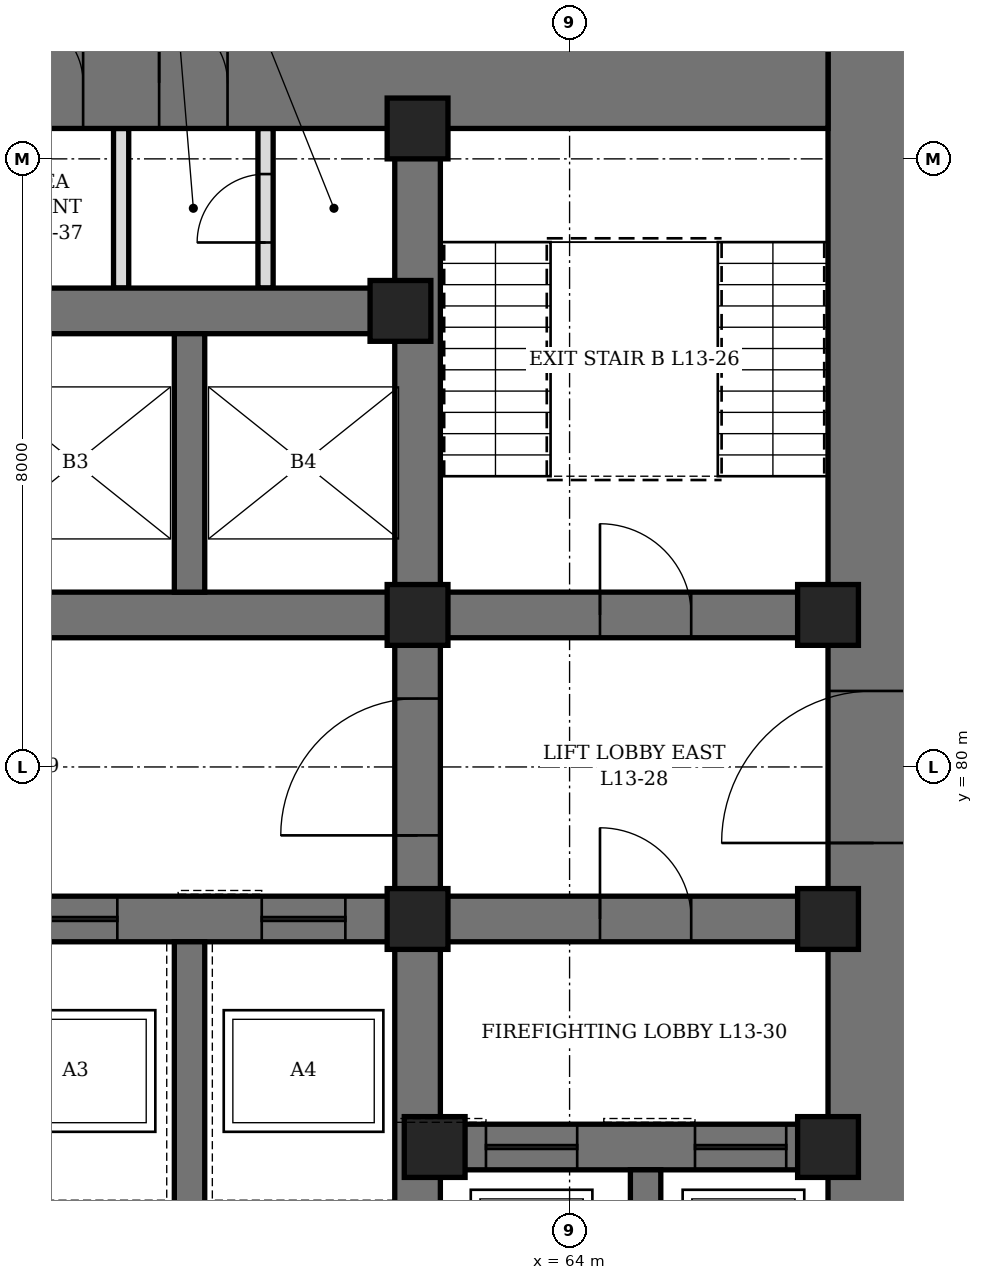
"""IFC4 building model, lengths in metres.
Left out: names, types, materials, properties, quantities, classifications, styles, units other than length and angle.
Written with IfcOpenShell. Run it as: python <this file> out.ifc"""

import sys

from ifc_helpers import new_model, si_unit, direction, frame, frame_2d, origin, origin_2d, place, context, subcontext, project, spatial, rectangle, hollow_rectangle, extrude, element, fill, save


model = new_model("IFC4")
c1 = context("Model", 3, precision=1e-05, world=origin(), true_north=direction((0.0, 1.0)))
c2 = subcontext(c1, "Body", "Model", "MODEL_VIEW")
j1 = project(units=[si_unit("LENGTHUNIT", "METRE"), si_unit("PLANEANGLEUNIT", "RADIAN")], contexts=[c1])
p1 = place(None, origin())
s1 = spatial("IfcSite", under=j1, at=p1, CompositionType="ELEMENT")
p2 = place(p1, origin())
s2 = spatial("IfcBuilding", under=s1, at=p2, CompositionType="ELEMENT")
p3 = place(p2, frame((0.0, 0.0, 64.3)))
s3 = spatial("IfcBuildingStorey", under=s2, at=p3, CompositionType="ELEMENT", Elevation=64.3)
p4 = place(p3, frame((68.0, 70.4, 0.0), z_axis=(0.0, 0.0, 1.0), x_axis=(0.0, 1.0, 0.0)))
e1 = element("IfcWall", 1, at=p4, inside=s3, PredefinedType="SHEAR", context=c2, shape_type="SweptSolid", body=[
    extrude(rectangle(XDim=19.2, YDim=1.2, at=frame_2d((9.6, 0.0))), origin(), (0.0, 0.0, 1.0), 4.2),
])
p5 = place(p4, frame((8.6, 0.0, 0.0)))
e2 = element("IfcOpeningElement", 2, at=p5, cuts=e1, PredefinedType="OPENING", context=c2, shape_type="SweptSolid", body=[
    extrude(rectangle(XDim=2.0, YDim=2.4, at=frame_2d((1.0, 1.2))), frame((0.0, 0.61, 0.0), z_axis=(0.0, -1.0, 0.0), x_axis=(1.0, 0.0, 0.0)), (0.0, 0.0, 1.0), 1.22),
])
p6 = place(p3, frame((44.6, 89.0, 0.0), z_axis=(0.0, 0.0, 1.0), x_axis=(1.0, 0.0, 0.0)))
e3 = element("IfcWall", 3, at=p6, inside=s3, PredefinedType="SHEAR", context=c2, shape_type="SweptSolid", body=[
    extrude(rectangle(XDim=22.8, YDim=1.2, at=frame_2d((11.4, 0.0))), origin(), (0.0, 0.0, 1.0), 4.2),
])
p7 = place(p6, frame((9.2, 0.0, 0.0)))
e4 = element("IfcOpeningElement", 4, at=p7, cuts=e3, PredefinedType="OPENING", context=c2, shape_type="SweptSolid", body=[
    extrude(rectangle(XDim=1.0, YDim=2.1, at=frame_2d((0.5, 1.05))), frame((0.0, 0.61, 0.0), z_axis=(0.0, -1.0, 0.0), x_axis=(1.0, 0.0, 0.0)), (0.0, 0.0, 1.0), 1.22),
])
p8 = place(p6, frame((6.45, 0.0, 0.0)))
e5 = element("IfcOpeningElement", 5, at=p8, cuts=e3, PredefinedType="OPENING", context=c2, shape_type="SweptSolid", body=[
    extrude(rectangle(XDim=0.9, YDim=2.1, at=frame_2d((0.45, 1.05))), frame((0.0, 0.61, 0.0), z_axis=(0.0, -1.0, 0.0), x_axis=(1.0, 0.0, 0.0)), (0.0, 0.0, 1.0), 1.22),
])
p9 = place(p6, frame((12.1, 0.0, 0.0)))
e6 = element("IfcOpeningElement", 6, at=p9, cuts=e3, PredefinedType="OPENING", context=c2, shape_type="SweptSolid", body=[
    extrude(rectangle(XDim=0.9, YDim=2.1, at=frame_2d((0.45, 1.05))), frame((0.0, 0.61, 0.0), z_axis=(0.0, -1.0, 0.0), x_axis=(1.0, 0.0, 0.0)), (0.0, 0.0, 1.0), 1.22),
])
p10 = place(p6, frame((14.0, 0.0, 0.0)))
e7 = element("IfcOpeningElement", 7, at=p10, cuts=e3, PredefinedType="OPENING", context=c2, shape_type="SweptSolid", body=[
    extrude(rectangle(XDim=0.9, YDim=2.1, at=frame_2d((0.45, 1.05))), frame((0.0, 0.61, 0.0), z_axis=(0.0, -1.0, 0.0), x_axis=(1.0, 0.0, 0.0)), (0.0, 0.0, 1.0), 1.22),
])
p11 = place(p3, frame((62.0, 71.6, 0.0), z_axis=(0.0, 0.0, 1.0), x_axis=(0.0, 1.0, 0.0)))
e8 = element("IfcWall", 8, at=p11, inside=s3, PredefinedType="SHEAR", context=c2, shape_type="SweptSolid", body=[
    extrude(rectangle(XDim=16.8, YDim=0.6, at=frame_2d((8.4, 0.0))), origin(), (0.0, 0.0, 1.0), 4.2),
])
p12 = place(p11, frame((7.5, 0.0, 0.0)))
e9 = element("IfcOpeningElement", 9, at=p12, cuts=e8, PredefinedType="OPENING", context=c2, shape_type="SweptSolid", body=[
    extrude(rectangle(XDim=1.8, YDim=2.4, at=frame_2d((0.9, 1.2))), frame((0.0, 0.31, 0.0), z_axis=(0.0, -1.0, 0.0), x_axis=(1.0, 0.0, 0.0)), (0.0, 0.0, 1.0), 0.62),
])
p13 = place(p3, frame((62.3, 75.0, 0.0), z_axis=(0.0, 0.0, 1.0), x_axis=(1.0, 0.0, 0.0)))
e10 = element("IfcWall", 10, at=p13, inside=s3, PredefinedType="SHEAR", context=c2, shape_type="SweptSolid", body=[
    extrude(rectangle(XDim=5.1, YDim=0.6, at=frame_2d((2.55, 0.0))), origin(), (0.0, 0.0, 1.0), 4.2),
])
p14 = place(p13, frame((0.6, 0.0, 0.0)))
e11 = element("IfcOpeningElement", 11, at=p14, cuts=e10, PredefinedType="OPENING", context=c2, shape_type="SweptSolid", body=[
    extrude(rectangle(XDim=1.2, YDim=2.2, at=frame_2d((0.6, 1.1))), frame((0.0, 0.31, 0.0), z_axis=(0.0, -1.0, 0.0), x_axis=(1.0, 0.0, 0.0)), (0.0, 0.0, 1.0), 0.62),
])
p15 = place(p13, frame((3.35, 0.0, 0.0)))
e12 = element("IfcOpeningElement", 12, at=p15, cuts=e10, PredefinedType="OPENING", context=c2, shape_type="SweptSolid", body=[
    extrude(rectangle(XDim=1.2, YDim=2.2, at=frame_2d((0.6, 1.1))), frame((0.0, 0.31, 0.0), z_axis=(0.0, -1.0, 0.0), x_axis=(1.0, 0.0, 0.0)), (0.0, 0.0, 1.0), 0.62),
])
p16 = place(p3, frame((62.3, 78.0, 0.0), z_axis=(0.0, 0.0, 1.0), x_axis=(1.0, 0.0, 0.0)))
e13 = element("IfcWall", 13, at=p16, inside=s3, PredefinedType="SHEAR", context=c2, shape_type="SweptSolid", body=[
    extrude(rectangle(XDim=5.1, YDim=0.6, at=frame_2d((2.55, 0.0))), origin(), (0.0, 0.0, 1.0), 4.2),
])
p17 = place(p16, frame((2.1, 0.0, 0.0)))
e14 = element("IfcOpeningElement", 14, at=p17, cuts=e13, PredefinedType="OPENING", context=c2, shape_type="SweptSolid", body=[
    extrude(rectangle(XDim=1.2, YDim=2.1, at=frame_2d((0.6, 1.05))), frame((0.0, 0.31, 0.0), z_axis=(0.0, -1.0, 0.0), x_axis=(1.0, 0.0, 0.0)), (0.0, 0.0, 1.0), 0.62),
])
p18 = place(p3, frame((62.3, 82.0, 0.0), z_axis=(0.0, 0.0, 1.0), x_axis=(1.0, 0.0, 0.0)))
e15 = element("IfcWall", 15, at=p18, inside=s3, PredefinedType="SHEAR", context=c2, shape_type="SweptSolid", body=[
    extrude(rectangle(XDim=5.1, YDim=0.6, at=frame_2d((2.55, 0.0))), origin(), (0.0, 0.0, 1.0), 4.2),
])
p19 = place(p18, frame((2.1, 0.0, 0.0)))
e16 = element("IfcOpeningElement", 16, at=p19, cuts=e15, PredefinedType="OPENING", context=c2, shape_type="SweptSolid", body=[
    extrude(rectangle(XDim=1.2, YDim=2.1, at=frame_2d((0.6, 1.05))), frame((0.0, 0.31, 0.0), z_axis=(0.0, -1.0, 0.0), x_axis=(1.0, 0.0, 0.0)), (0.0, 0.0, 1.0), 0.62),
])
p20 = place(p3, frame((50.3, 78.0, 0.0), z_axis=(0.0, 0.0, 1.0), x_axis=(1.0, 0.0, 0.0)))
e17 = element("IfcWall", 17, at=p20, inside=s3, PredefinedType="SHEAR", context=c2, shape_type="SweptSolid", body=[
    extrude(rectangle(XDim=11.4, YDim=0.6, at=frame_2d((5.7, 0.0))), origin(), (0.0, 0.0, 1.0), 4.2),
])
p21 = place(p20, frame((0.65, 0.0, 0.0)))
e18 = element("IfcOpeningElement", 18, at=p21, cuts=e17, PredefinedType="OPENING", context=c2, shape_type="SweptSolid", body=[
    extrude(rectangle(XDim=1.1, YDim=2.2, at=frame_2d((0.55, 1.1))), frame((0.0, 0.31, 0.0), z_axis=(0.0, -1.0, 0.0), x_axis=(1.0, 0.0, 0.0)), (0.0, 0.0, 1.0), 0.62),
])
p22 = place(p20, frame((3.65, 0.0, 0.0)))
e19 = element("IfcOpeningElement", 19, at=p22, cuts=e17, PredefinedType="OPENING", context=c2, shape_type="SweptSolid", body=[
    extrude(rectangle(XDim=1.1, YDim=2.2, at=frame_2d((0.55, 1.1))), frame((0.0, 0.31, 0.0), z_axis=(0.0, -1.0, 0.0), x_axis=(1.0, 0.0, 0.0)), (0.0, 0.0, 1.0), 0.62),
])
p23 = place(p20, frame((6.65, 0.0, 0.0)))
e20 = element("IfcOpeningElement", 20, at=p23, cuts=e17, PredefinedType="OPENING", context=c2, shape_type="SweptSolid", body=[
    extrude(rectangle(XDim=1.1, YDim=2.2, at=frame_2d((0.55, 1.1))), frame((0.0, 0.31, 0.0), z_axis=(0.0, -1.0, 0.0), x_axis=(1.0, 0.0, 0.0)), (0.0, 0.0, 1.0), 0.62),
])
p24 = place(p20, frame((9.65, 0.0, 0.0)))
e21 = element("IfcOpeningElement", 21, at=p24, cuts=e17, PredefinedType="OPENING", context=c2, shape_type="SweptSolid", body=[
    extrude(rectangle(XDim=1.1, YDim=2.2, at=frame_2d((0.55, 1.1))), frame((0.0, 0.31, 0.0), z_axis=(0.0, -1.0, 0.0), x_axis=(1.0, 0.0, 0.0)), (0.0, 0.0, 1.0), 0.62),
])
for number, where, z_axis, x_axis in (
    (22, (50.3, 82.0, 0.0), (0.0, 0.0, 1.0), (1.0, 0.0, 0.0)),
    (23, (50.3, 86.0, 0.0), (0.0, 0.0, 1.0), (1.0, 0.0, 0.0)),
):
    element("IfcWall", number, at=place(p3, frame(where, z_axis=z_axis, x_axis=x_axis)), inside=s3, PredefinedType="SHEAR", context=c2, shape_type="SweptSolid", body=[
        extrude(rectangle(XDim=11.4, YDim=0.6, at=frame_2d((5.7, 0.0))), origin(), (0.0, 0.0, 1.0), 4.2),
    ])
p25 = place(p3, frame((59.0, 74.2, 0.0), z_axis=(0.0, 0.0, 1.0), x_axis=(0.0, 1.0, 0.0)))
e24 = element("IfcWall", 24, at=p25, inside=s3, PredefinedType="SHEAR", context=c2, shape_type="SweptSolid", body=[
    extrude(rectangle(XDim=3.5, YDim=0.4, at=frame_2d((1.75, 0.0))), origin(), (0.0, 0.0, 1.0), 4.2),
])
p26 = place(p3, frame((59.0, 82.3, 0.0), z_axis=(0.0, 0.0, 1.0), x_axis=(0.0, 1.0, 0.0)))
e25 = element("IfcWall", 25, at=p26, inside=s3, PredefinedType="SHEAR", context=c2, shape_type="SweptSolid", body=[
    extrude(rectangle(XDim=3.4, YDim=0.4, at=frame_2d((1.7, 0.0))), origin(), (0.0, 0.0, 1.0), 4.2),
])
p27 = place(p3, frame((65.0, 71.6, 0.0), z_axis=(0.0, 0.0, 1.0), x_axis=(0.0, 1.0, 0.0)))
e26 = element("IfcWall", 26, at=p27, inside=s3, PredefinedType="SHEAR", context=c2, shape_type="SweptSolid", body=[
    extrude(rectangle(XDim=3.1, YDim=0.4, at=frame_2d((1.55, 0.0))), origin(), (0.0, 0.0, 1.0), 4.2),
])
for number, where, z_axis, x_axis in (
    (27, (61.775, 86.0, 0.0), (0.0, 0.0, 1.0), (1.0, 0.0, 0.0)),
    (28, (62.0, 78.0, 0.0), (0.0, 0.0, 1.0), (1.0, 0.0, 0.0)),
    (29, (62.0, 82.0, 0.0), (0.0, 0.0, 1.0), (1.0, 0.0, 0.0)),
    (30, (62.0, 88.4, 0.0), (0.0, 0.0, 1.0), (1.0, 0.0, 0.0)),
    (31, (62.225, 75.0, 0.0), (0.0, 0.0, 1.0), (1.0, 0.0, 0.0)),
    (32, (67.4, 75.0, 0.0), (0.0, 0.0, 1.0), (1.0, 0.0, 0.0)),
    (33, (67.4, 78.0, 0.0), (0.0, 0.0, 1.0), (1.0, 0.0, 0.0)),
    (34, (67.4, 82.0, 0.0), (0.0, 0.0, 1.0), (1.0, 0.0, 0.0)),
):
    element("IfcColumn", number, at=place(p3, frame(where, z_axis=z_axis, x_axis=x_axis)), inside=s3, PredefinedType="COLUMN", context=c2, shape_type="SweptSolid", body=[
        extrude(hollow_rectangle(XDim=0.8, YDim=0.8, WallThickness=0.1, at=origin_2d()), origin(), (0.0, 0.0, 1.0), 4.2),
    ])
p28 = place(p3, frame((60.0, 86.3, 0.0), z_axis=(0.0, 0.0, 1.0), x_axis=(0.0, 1.0, 0.0)))
e35 = element("IfcWall", 35, at=p28, inside=s3, PredefinedType="PARTITIONING", context=c2, shape_type="SweptSolid", body=[
    extrude(rectangle(XDim=2.1, YDim=0.2, at=frame_2d((1.05, 0.0))), origin(), (0.0, 0.0, 1.0), 4.04),
])
p29 = place(p28, frame((0.6, 0.0, 0.0)))
e36 = element("IfcOpeningElement", 36, at=p29, cuts=e35, PredefinedType="OPENING", context=c2, shape_type="SweptSolid", body=[
    extrude(rectangle(XDim=0.9, YDim=2.1, at=frame_2d((0.45, 1.05))), frame((0.0, 0.11, 0.0), z_axis=(0.0, -1.0, 0.0), x_axis=(1.0, 0.0, 0.0)), (0.0, 0.0, 1.0), 0.22),
])
p30 = place(p3, frame((58.1, 86.3, 0.0), z_axis=(0.0, 0.0, 1.0), x_axis=(0.0, 1.0, 0.0)))
e37 = element("IfcWall", 37, at=p30, inside=s3, PredefinedType="PARTITIONING", context=c2, shape_type="SweptSolid", body=[
    extrude(rectangle(XDim=2.1, YDim=0.2, at=frame_2d((1.05, 0.0))), origin(), (0.0, 0.0, 1.0), 4.04),
])
p31 = place(p9, origin())
e38 = element("IfcDoor", 38, at=p31, inside=s3, OperationType="SINGLE_SWING_LEFT", PredefinedType="DOOR", context=c2, shape_type="SweptSolid", body=[
    extrude(rectangle(XDim=0.9, YDim=2.1, at=frame_2d((0.45, 1.05))), frame((0.0, 0.35, 0.0), z_axis=(0.0, -1.0, 0.0), x_axis=(1.0, 0.0, 0.0)), (0.0, 0.0, 1.0), 0.7),
])
fill(e6, e38)
p32 = place(p10, origin())
e39 = element("IfcDoor", 39, at=p32, inside=s3, OperationType="SINGLE_SWING_LEFT", PredefinedType="DOOR", context=c2, shape_type="SweptSolid", body=[
    extrude(rectangle(XDim=0.9, YDim=2.1, at=frame_2d((0.45, 1.05))), frame((0.0, 0.35, 0.0), z_axis=(0.0, -1.0, 0.0), x_axis=(1.0, 0.0, 0.0)), (0.0, 0.0, 1.0), 0.7),
])
fill(e7, e39)
p33 = place(p29, origin())
e40 = element("IfcDoor", 40, at=p33, inside=s3, OperationType="SINGLE_SWING_LEFT", PredefinedType="DOOR", context=c2, shape_type="SweptSolid", body=[
    extrude(rectangle(XDim=0.9, YDim=2.1, at=frame_2d((0.45, 1.05))), frame((0.0, 0.1, 0.0), z_axis=(0.0, -1.0, 0.0), x_axis=(1.0, 0.0, 0.0)), (0.0, 0.0, 1.0), 0.199),
])
fill(e36, e40)
p34 = place(p19, origin())
e41 = element("IfcDoor", 41, at=p34, inside=s3, OperationType="SINGLE_SWING_LEFT", PredefinedType="DOOR", context=c2, shape_type="SweptSolid", body=[
    extrude(rectangle(XDim=1.2, YDim=2.1, at=frame_2d((0.6, 1.05))), frame((0.0, 0.3, 0.0), z_axis=(0.0, -1.0, 0.0), x_axis=(1.0, 0.0, 0.0)), (0.0, 0.0, 1.0), 0.6),
])
fill(e16, e41)
p35 = place(p5, origin())
e42 = element("IfcDoor", 42, at=p35, inside=s3, OperationType="DOUBLE_DOOR_SINGLE_SWING", PredefinedType="DOOR", context=c2, shape_type="SweptSolid", body=[
    extrude(rectangle(XDim=2.0, YDim=2.4, at=frame_2d((1.0, 1.2))), frame((0.0, 0.35, 0.0), z_axis=(0.0, -1.0, 0.0), x_axis=(1.0, 0.0, 0.0)), (0.0, 0.0, 1.0), 0.7),
])
fill(e2, e42)
p36 = place(p12, origin())
e43 = element("IfcDoor", 43, at=p36, inside=s3, OperationType="DOUBLE_DOOR_SINGLE_SWING", PredefinedType="DOOR", context=c2, shape_type="SweptSolid", body=[
    extrude(rectangle(XDim=1.8, YDim=2.4, at=frame_2d((0.9, 1.2))), frame((0.0, 0.3, 0.0), z_axis=(0.0, -1.0, 0.0), x_axis=(1.0, 0.0, 0.0)), (0.0, 0.0, 1.0), 0.6),
])
fill(e9, e43)
p37 = place(p17, origin())
e44 = element("IfcDoor", 44, at=p37, inside=s3, OperationType="SINGLE_SWING_RIGHT", PredefinedType="DOOR", context=c2, shape_type="SweptSolid", body=[
    extrude(rectangle(XDim=1.2, YDim=2.1, at=frame_2d((0.6, 1.05))), frame((0.0, 0.3, 0.0), z_axis=(0.0, -1.0, 0.0), x_axis=(1.0, 0.0, 0.0)), (0.0, 0.0, 1.0), 0.6),
])
fill(e14, e44)
p38 = place(p23, origin())
e45 = element("IfcDoor", 45, at=p38, inside=s3, OperationType="SLIDING_TO_LEFT", PredefinedType="DOOR", context=c2, shape_type="SweptSolid", body=[
    extrude(rectangle(XDim=1.1, YDim=2.2, at=frame_2d((0.55, 1.1))), frame((0.0, 0.3, 0.0), z_axis=(0.0, -1.0, 0.0), x_axis=(1.0, 0.0, 0.0)), (0.0, 0.0, 1.0), 0.6),
])
fill(e20, e45)
p39 = place(p24, origin())
e46 = element("IfcDoor", 46, at=p39, inside=s3, OperationType="SLIDING_TO_LEFT", PredefinedType="DOOR", context=c2, shape_type="SweptSolid", body=[
    extrude(rectangle(XDim=1.1, YDim=2.2, at=frame_2d((0.55, 1.1))), frame((0.0, 0.3, 0.0), z_axis=(0.0, -1.0, 0.0), x_axis=(1.0, 0.0, 0.0)), (0.0, 0.0, 1.0), 0.6),
])
fill(e21, e46)
p40 = place(p14, origin())
e47 = element("IfcDoor", 47, at=p40, inside=s3, OperationType="SLIDING_TO_LEFT", PredefinedType="DOOR", context=c2, shape_type="SweptSolid", body=[
    extrude(rectangle(XDim=1.2, YDim=2.2, at=frame_2d((0.6, 1.1))), frame((0.0, 0.3, 0.0), z_axis=(0.0, -1.0, 0.0), x_axis=(1.0, 0.0, 0.0)), (0.0, 0.0, 1.0), 0.6),
])
fill(e11, e47)
p41 = place(p15, origin())
e48 = element("IfcDoor", 48, at=p41, inside=s3, OperationType="SLIDING_TO_LEFT", PredefinedType="DOOR", context=c2, shape_type="SweptSolid", body=[
    extrude(rectangle(XDim=1.2, YDim=2.2, at=frame_2d((0.6, 1.1))), frame((0.0, 0.3, 0.0), z_axis=(0.0, -1.0, 0.0), x_axis=(1.0, 0.0, 0.0)), (0.0, 0.0, 1.0), 0.6),
])
fill(e12, e48)
save(model, sys.argv[1])
